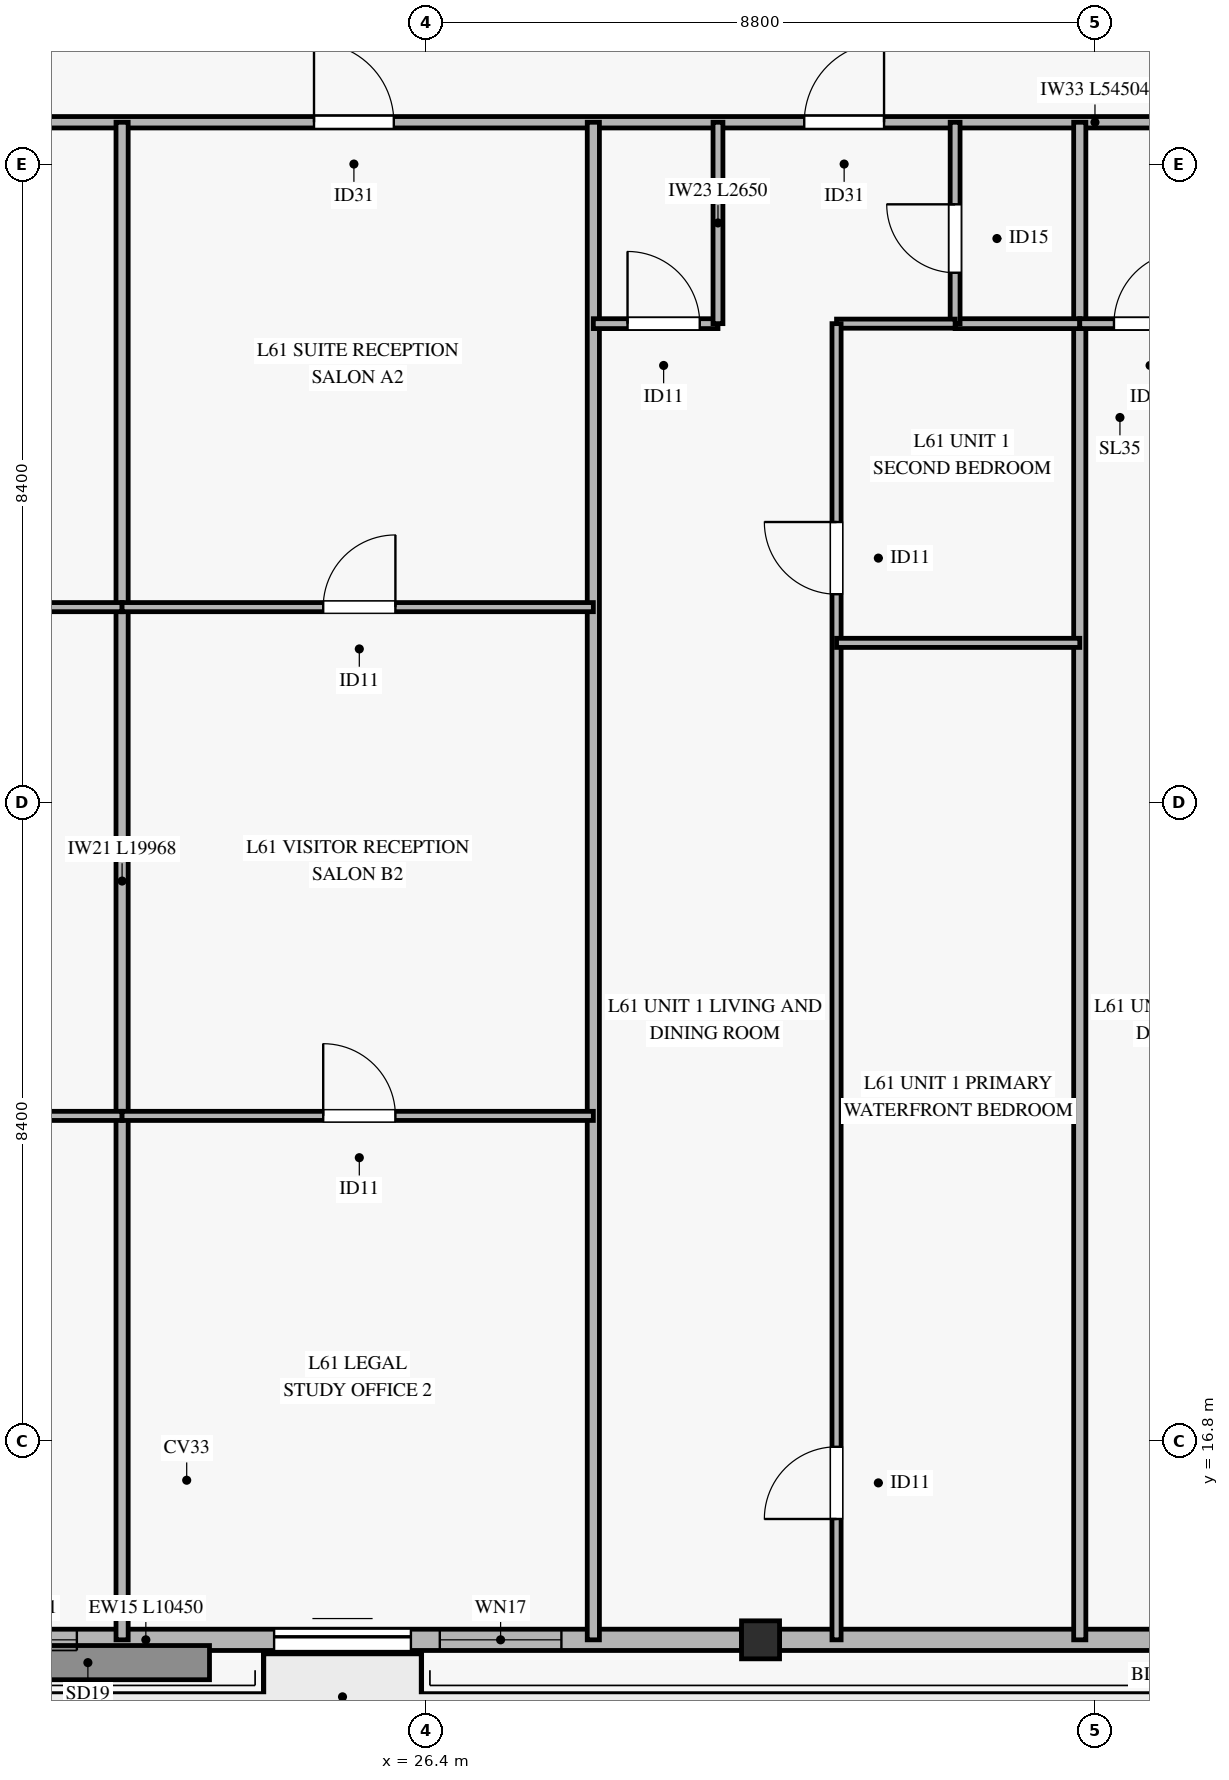
"""IFC4 building model, lengths in metres.
Left out: names, types, materials, properties, quantities, classifications, styles, units other than length and angle.
Written with IfcOpenShell. Run it as: python <this file> out.ifc"""

import sys

from ifc_helpers import new_model, si_unit, direction, frame, frame_2d, origin, origin_2d, place, context, subcontext, project, spatial, rectangle, hollow_rectangle, extrude, source, transform, mapped, element, fill, save


model = new_model("IFC4")
c1 = context("Model", 3, precision=1e-05, world=origin(), true_north=direction((0.0, 1.0)))
c2 = subcontext(c1, "Body", "Model", "MODEL_VIEW")
j1 = project(units=[si_unit("LENGTHUNIT", "METRE"), si_unit("PLANEANGLEUNIT", "RADIAN")], contexts=[c1])
p1 = place(None, origin())
s1 = spatial("IfcSite", under=j1, at=p1, CompositionType="ELEMENT")
p2 = place(p1, origin())
s2 = spatial("IfcBuilding", under=s1, at=p2, CompositionType="ELEMENT")
p3 = place(p2, frame((0.0, 0.0, 241.7)))
s3 = spatial("IfcBuildingStorey", under=s2, at=p3, CompositionType="ELEMENT", Elevation=241.7)
m1 = source(origin(), c2, "Body", "SweptSolid", [
    extrude(hollow_rectangle(XDim=0.5, YDim=0.5, WallThickness=0.024, at=origin_2d()), origin(), (0.0, 0.0, 1.0), 3.185),
])
p4 = place(p3, frame((30.8, 14.182, 0.0), z_axis=(0.0, 0.0, 1.0), x_axis=(1.0, 0.0, 0.0)))
e1 = element("IfcColumn", 1, at=p4, inside=s3, PredefinedType="COLUMN", context=c2, shape_type="MappedRepresentation", body=[
    mapped(m1, transform((0.0, 0.0, 0.0), x_axis=(1.0, 0.0, 0.0), y_axis=(0.0, 1.0, 0.0), z_axis=(0.0, 0.0, 1.0), scale=1.0)),
])
p5 = place(p3, frame((20.1, 14.182, 0.0), z_axis=(0.0, 0.0, 1.0), x_axis=(1.0, 0.0, 0.0)))
e2 = element("IfcWall", 2, at=p5, inside=s3, PredefinedType="SOLIDWALL", context=c2, shape_type="SweptSolid", body=[
    extrude(rectangle(XDim=10.45, YDim=0.28, at=frame_2d((5.225, 0.0))), origin(), (0.0, 0.0, 1.0), 2.815),
])
p6 = place(p5, frame((4.3, 0.0, 0.0)))
e3 = element("IfcOpeningElement", 3, at=p6, cuts=e2, PredefinedType="OPENING", context=c2, shape_type="SweptSolid", body=[
    extrude(rectangle(XDim=1.8, YDim=2.25, at=frame_2d((0.9, 1.125))), frame((0.0, 0.15, 0.0), z_axis=(0.0, -1.0, 0.0), x_axis=(1.0, 0.0, 0.0)), (0.0, 0.0, 1.0), 0.3),
])
p7 = place(p5, frame((0.505, 0.0, 0.45)))
e4 = element("IfcOpeningElement", 4, at=p7, cuts=e2, PredefinedType="OPENING", context=c2, shape_type="SweptSolid", body=[
    extrude(rectangle(XDim=1.2, YDim=2.0, at=frame_2d((0.6, 1.0))), frame((0.0, 0.15, 0.0), z_axis=(0.0, -1.0, 0.0), x_axis=(1.0, 0.0, 0.0)), (0.0, 0.0, 1.0), 0.3),
])
p8 = place(p5, frame((6.48, 0.0, 0.45)))
e5 = element("IfcOpeningElement", 5, at=p8, cuts=e2, PredefinedType="OPENING", context=c2, shape_type="SweptSolid", body=[
    extrude(rectangle(XDim=1.6, YDim=2.0, at=frame_2d((0.8, 1.0))), frame((0.0, 0.15, 0.0), z_axis=(0.0, -1.0, 0.0), x_axis=(1.0, 0.0, 0.0)), (0.0, 0.0, 1.0), 0.3),
])
p9 = place(p3, frame((31.05, 14.182, 0.0), z_axis=(0.0, 0.0, 1.0), x_axis=(1.0, 0.0, 0.0)))
e6 = element("IfcWall", 6, at=p9, inside=s3, PredefinedType="SOLIDWALL", context=c2, shape_type="SweptSolid", body=[
    extrude(rectangle(XDim=6.25, YDim=0.28, at=frame_2d((3.125, 0.0))), origin(), (0.0, 0.0, 1.0), 2.815),
])
p10 = place(p3, frame((7.948, 34.15, 0.0), z_axis=(0.0, 0.0, 1.0), x_axis=(1.0, 0.0, 0.0)))
e7 = element("IfcWall", 7, at=p10, inside=s3, PredefinedType="PARTITIONING", context=c2, shape_type="SweptSolid", body=[
    extrude(rectangle(XDim=54.504, YDim=0.15, at=frame_2d((27.252, 0.0))), origin(), (0.0, 0.0, 1.0), 2.47),
])
p11 = place(p10, frame((5.785, 0.0, 0.0)))
e8 = element("IfcOpeningElement", 8, at=p11, cuts=e7, PredefinedType="OPENING", context=c2, shape_type="SweptSolid", body=[
    extrude(rectangle(XDim=1.05, YDim=2.15, at=frame_2d((0.525, 1.075))), frame((0.0, 0.085, 0.0), z_axis=(0.0, -1.0, 0.0), x_axis=(1.0, 0.0, 0.0)), (0.0, 0.0, 1.0), 0.17),
])
p12 = place(p10, frame((16.977, 0.0, 0.0)))
e9 = element("IfcOpeningElement", 9, at=p12, cuts=e7, PredefinedType="OPENING", context=c2, shape_type="SweptSolid", body=[
    extrude(rectangle(XDim=1.05, YDim=2.15, at=frame_2d((0.525, 1.075))), frame((0.0, 0.085, 0.0), z_axis=(0.0, -1.0, 0.0), x_axis=(1.0, 0.0, 0.0)), (0.0, 0.0, 1.0), 0.17),
])
p13 = place(p10, frame((23.427, 0.0, 0.0)))
e10 = element("IfcOpeningElement", 10, at=p13, cuts=e7, PredefinedType="OPENING", context=c2, shape_type="SweptSolid", body=[
    extrude(rectangle(XDim=1.05, YDim=2.15, at=frame_2d((0.525, 1.075))), frame((0.0, 0.085, 0.0), z_axis=(0.0, -1.0, 0.0), x_axis=(1.0, 0.0, 0.0)), (0.0, 0.0, 1.0), 0.17),
])
p14 = place(p10, frame((29.827, 0.0, 0.0)))
e11 = element("IfcOpeningElement", 11, at=p14, cuts=e7, PredefinedType="OPENING", context=c2, shape_type="SweptSolid", body=[
    extrude(rectangle(XDim=1.05, YDim=2.15, at=frame_2d((0.525, 1.075))), frame((0.0, 0.085, 0.0), z_axis=(0.0, -1.0, 0.0), x_axis=(1.0, 0.0, 0.0)), (0.0, 0.0, 1.0), 0.17),
])
p15 = place(p10, frame((36.927, 0.0, 0.0)))
e12 = element("IfcOpeningElement", 12, at=p15, cuts=e7, PredefinedType="OPENING", context=c2, shape_type="SweptSolid", body=[
    extrude(rectangle(XDim=1.05, YDim=2.15, at=frame_2d((0.525, 1.075))), frame((0.0, 0.085, 0.0), z_axis=(0.0, -1.0, 0.0), x_axis=(1.0, 0.0, 0.0)), (0.0, 0.0, 1.0), 0.17),
])
p16 = place(p10, frame((46.381, 0.0, 0.0)))
e13 = element("IfcOpeningElement", 13, at=p16, cuts=e7, PredefinedType="OPENING", context=c2, shape_type="SweptSolid", body=[
    extrude(rectangle(XDim=1.05, YDim=2.15, at=frame_2d((0.525, 1.075))), frame((0.0, 0.085, 0.0), z_axis=(0.0, -1.0, 0.0), x_axis=(1.0, 0.0, 0.0)), (0.0, 0.0, 1.0), 0.17),
])
for number, where, z_axis, x_axis in (
    (14, (22.4, 14.182, 0.0), (0.0, 0.0, 1.0), (0.0, 1.0, 0.0)),
    (15, (28.6, 14.182, 0.0), (0.0, 0.0, 1.0), (0.0, 1.0, 0.0)),
    (16, (35.0, 14.182, 0.0), (0.0, 0.0, 1.0), (0.0, 1.0, 0.0)),
):
    element("IfcWall", number, at=place(p3, frame(where, z_axis=z_axis, x_axis=x_axis)), inside=s3, PredefinedType="PARTITIONING", context=c2, shape_type="SweptSolid", body=[
        extrude(rectangle(XDim=19.968, YDim=0.16, at=frame_2d((9.984, 0.0))), origin(), (0.0, 0.0, 1.0), 2.77),
    ])
p17 = place(p3, frame((7.948, 21.076, 0.0), z_axis=(0.0, 0.0, 1.0), x_axis=(1.0, 0.0, 0.0)))
e17 = element("IfcWall", 17, at=p17, inside=s3, PredefinedType="PARTITIONING", context=c2, shape_type="SweptSolid", body=[
    extrude(rectangle(XDim=14.452, YDim=0.12, at=frame_2d((7.226, 0.0))), origin(), (0.0, 0.0, 1.0), 2.47),
])
p18 = place(p17, frame((6.067, 0.0, 0.0)))
e18 = element("IfcOpeningElement", 18, at=p18, cuts=e17, PredefinedType="OPENING", context=c2, shape_type="SweptSolid", body=[
    extrude(rectangle(XDim=0.95, YDim=2.1, at=frame_2d((0.475, 1.05))), frame((0.0, 0.07, 0.0), z_axis=(0.0, -1.0, 0.0), x_axis=(1.0, 0.0, 0.0)), (0.0, 0.0, 1.0), 0.14),
])
p19 = place(p3, frame((7.948, 27.77, 0.0), z_axis=(0.0, 0.0, 1.0), x_axis=(1.0, 0.0, 0.0)))
e19 = element("IfcWall", 19, at=p19, inside=s3, PredefinedType="PARTITIONING", context=c2, shape_type="SweptSolid", body=[
    extrude(rectangle(XDim=14.452, YDim=0.12, at=frame_2d((7.226, 0.0))), origin(), (0.0, 0.0, 1.0), 2.47),
])
p20 = place(p19, frame((6.067, 0.0, 0.0)))
e20 = element("IfcOpeningElement", 20, at=p20, cuts=e19, PredefinedType="OPENING", context=c2, shape_type="SweptSolid", body=[
    extrude(rectangle(XDim=0.95, YDim=2.1, at=frame_2d((0.475, 1.05))), frame((0.0, 0.07, 0.0), z_axis=(0.0, -1.0, 0.0), x_axis=(1.0, 0.0, 0.0)), (0.0, 0.0, 1.0), 0.14),
])
p21 = place(p3, frame((22.4, 21.076, 0.0), z_axis=(0.0, 0.0, 1.0), x_axis=(1.0, 0.0, 0.0)))
e21 = element("IfcWall", 21, at=p21, inside=s3, PredefinedType="PARTITIONING", context=c2, shape_type="SweptSolid", body=[
    extrude(rectangle(XDim=6.2, YDim=0.12, at=frame_2d((3.1, 0.0))), origin(), (0.0, 0.0, 1.0), 3.185),
])
p22 = place(p21, frame((2.646, 0.0, 0.0)))
e22 = element("IfcOpeningElement", 22, at=p22, cuts=e21, PredefinedType="OPENING", context=c2, shape_type="SweptSolid", body=[
    extrude(rectangle(XDim=0.95, YDim=2.1, at=frame_2d((0.475, 1.05))), frame((0.0, 0.07, 0.0), z_axis=(0.0, -1.0, 0.0), x_axis=(1.0, 0.0, 0.0)), (0.0, 0.0, 1.0), 0.14),
])
p23 = place(p3, frame((22.4, 27.77, 0.0), z_axis=(0.0, 0.0, 1.0), x_axis=(1.0, 0.0, 0.0)))
e23 = element("IfcWall", 23, at=p23, inside=s3, PredefinedType="PARTITIONING", context=c2, shape_type="SweptSolid", body=[
    extrude(rectangle(XDim=6.2, YDim=0.12, at=frame_2d((3.1, 0.0))), origin(), (0.0, 0.0, 1.0), 3.185),
])
p24 = place(p23, frame((2.646, 0.0, 0.0)))
e24 = element("IfcOpeningElement", 24, at=p24, cuts=e23, PredefinedType="OPENING", context=c2, shape_type="SweptSolid", body=[
    extrude(rectangle(XDim=0.95, YDim=2.1, at=frame_2d((0.475, 1.05))), frame((0.0, 0.07, 0.0), z_axis=(0.0, -1.0, 0.0), x_axis=(1.0, 0.0, 0.0)), (0.0, 0.0, 1.0), 0.14),
])
p25 = place(p3, frame((28.6, 31.5, 0.0), z_axis=(0.0, 0.0, 1.0), x_axis=(1.0, 0.0, 0.0)))
e25 = element("IfcWall", 25, at=p25, inside=s3, PredefinedType="PARTITIONING", context=c2, shape_type="SweptSolid", body=[
    extrude(rectangle(XDim=1.64, YDim=0.13, at=frame_2d((0.82, 0.0))), origin(), (0.0, 0.0, 1.0), 3.185),
])
p26 = place(p25, frame((0.45, 0.0, 0.0)))
e26 = element("IfcOpeningElement", 26, at=p26, cuts=e25, PredefinedType="OPENING", context=c2, shape_type="SweptSolid", body=[
    extrude(rectangle(XDim=0.95, YDim=2.1, at=frame_2d((0.475, 1.05))), frame((0.0, 0.075, 0.0), z_axis=(0.0, -1.0, 0.0), x_axis=(1.0, 0.0, 0.0)), (0.0, 0.0, 1.0), 0.15),
])
p27 = place(p3, frame((30.24, 31.5, 0.0), z_axis=(0.0, 0.0, 1.0), x_axis=(0.0, 1.0, 0.0)))
e27 = element("IfcWall", 27, at=p27, inside=s3, PredefinedType="PARTITIONING", context=c2, shape_type="SweptSolid", body=[
    extrude(rectangle(XDim=2.65, YDim=0.13, at=frame_2d((1.325, 0.0))), origin(), (0.0, 0.0, 1.0), 2.77),
])
p28 = place(p3, frame((33.36, 31.5, 0.0), z_axis=(0.0, 0.0, 1.0), x_axis=(1.0, 0.0, 0.0)))
e28 = element("IfcWall", 28, at=p28, inside=s3, PredefinedType="PARTITIONING", context=c2, shape_type="SweptSolid", body=[
    extrude(rectangle(XDim=1.64, YDim=0.13, at=frame_2d((0.82, 0.0))), origin(), (0.0, 0.0, 1.0), 3.185),
])
p29 = place(p3, frame((33.36, 31.5, 0.0), z_axis=(0.0, 0.0, 1.0), x_axis=(0.0, 1.0, 0.0)))
e29 = element("IfcWall", 29, at=p29, inside=s3, PredefinedType="PARTITIONING", context=c2, shape_type="SweptSolid", body=[
    extrude(rectangle(XDim=2.65, YDim=0.13, at=frame_2d((1.325, 0.0))), origin(), (0.0, 0.0, 1.0), 2.77),
])
p30 = place(p29, frame((0.67, 0.0, 0.0)))
e30 = element("IfcOpeningElement", 30, at=p30, cuts=e29, PredefinedType="OPENING", context=c2, shape_type="SweptSolid", body=[
    extrude(rectangle(XDim=0.9, YDim=2.1, at=frame_2d((0.45, 1.05))), frame((0.0, 0.075, 0.0), z_axis=(0.0, -1.0, 0.0), x_axis=(1.0, 0.0, 0.0)), (0.0, 0.0, 1.0), 0.15),
])
p31 = place(p3, frame((31.8, 31.5, 0.0), z_axis=(0.0, 0.0, 1.0), x_axis=(1.0, 0.0, 0.0)))
e31 = element("IfcWall", 31, at=p31, inside=s3, PredefinedType="PARTITIONING", context=c2, shape_type="SweptSolid", body=[
    extrude(rectangle(XDim=1.56, YDim=0.12, at=frame_2d((0.78, 0.0))), origin(), (0.0, 0.0, 1.0), 3.185),
])
p32 = place(p3, frame((31.8, 14.182, 0.0), z_axis=(0.0, 0.0, 1.0), x_axis=(0.0, 1.0, 0.0)))
e32 = element("IfcWall", 32, at=p32, inside=s3, PredefinedType="PARTITIONING", context=c2, shape_type="SweptSolid", body=[
    extrude(rectangle(XDim=17.318, YDim=0.12, at=frame_2d((8.659, 0.0))), origin(), (0.0, 0.0, 1.0), 2.77),
])
p33 = place(p32, frame((1.59, 0.0, 0.0)))
e33 = element("IfcOpeningElement", 33, at=p33, cuts=e32, PredefinedType="OPENING", context=c2, shape_type="SweptSolid", body=[
    extrude(rectangle(XDim=0.95, YDim=2.1, at=frame_2d((0.475, 1.05))), frame((0.0, 0.07, 0.0), z_axis=(0.0, -1.0, 0.0), x_axis=(1.0, 0.0, 0.0)), (0.0, 0.0, 1.0), 0.14),
])
p34 = place(p32, frame((13.758, 0.0, 0.0)))
e34 = element("IfcOpeningElement", 34, at=p34, cuts=e32, PredefinedType="OPENING", context=c2, shape_type="SweptSolid", body=[
    extrude(rectangle(XDim=0.95, YDim=2.1, at=frame_2d((0.475, 1.05))), frame((0.0, 0.07, 0.0), z_axis=(0.0, -1.0, 0.0), x_axis=(1.0, 0.0, 0.0)), (0.0, 0.0, 1.0), 0.14),
])
p35 = place(p3, frame((31.8, 27.3, 0.0), z_axis=(0.0, 0.0, 1.0), x_axis=(1.0, 0.0, 0.0)))
e35 = element("IfcWall", 35, at=p35, inside=s3, PredefinedType="PARTITIONING", context=c2, shape_type="SweptSolid", body=[
    extrude(rectangle(XDim=3.2, YDim=0.12, at=frame_2d((1.6, 0.0))), origin(), (0.0, 0.0, 1.0), 3.185),
])
p36 = place(p3, frame((35.0, 31.5, 0.0), z_axis=(0.0, 0.0, 1.0), x_axis=(1.0, 0.0, 0.0)))
e36 = element("IfcWall", 36, at=p36, inside=s3, PredefinedType="PARTITIONING", context=c2, shape_type="SweptSolid", body=[
    extrude(rectangle(XDim=1.64, YDim=0.13, at=frame_2d((0.82, 0.0))), origin(), (0.0, 0.0, 1.0), 3.185),
])
p37 = place(p36, frame((0.45, 0.0, 0.0)))
e37 = element("IfcOpeningElement", 37, at=p37, cuts=e36, PredefinedType="OPENING", context=c2, shape_type="SweptSolid", body=[
    extrude(rectangle(XDim=0.95, YDim=2.1, at=frame_2d((0.475, 1.05))), frame((0.0, 0.075, 0.0), z_axis=(0.0, -1.0, 0.0), x_axis=(1.0, 0.0, 0.0)), (0.0, 0.0, 1.0), 0.15),
])
m2 = source(origin(), c2, "Body", "SweptSolid", [
    extrude(rectangle(XDim=1.8, YDim=2.25, at=frame_2d((0.9, 1.125))), frame((0.0, 0.025, 0.0), z_axis=(0.0, -1.0, 0.0), x_axis=(1.0, 0.0, 0.0)), (0.0, 0.0, 1.0), 0.05),
])
p38 = place(p6, origin())
e38 = element("IfcDoor", 38, at=p38, inside=s3, OperationType="SLIDING_TO_LEFT", PredefinedType="DOOR", context=c2, shape_type="MappedRepresentation", body=[
    mapped(m2, transform((0.0, 0.0, 0.0), x_axis=(1.0, 0.0, 0.0), y_axis=(0.0, 1.0, 0.0), z_axis=(0.0, 0.0, 1.0), scale=1.0)),
])
fill(e3, e38)
m3 = source(origin(), c2, "Body", "SweptSolid", [
    extrude(rectangle(XDim=1.2, YDim=2.0, at=frame_2d((0.6, 1.0))), frame((0.0, 0.03, 0.0), z_axis=(0.0, -1.0, 0.0), x_axis=(1.0, 0.0, 0.0)), (0.0, 0.0, 1.0), 0.06),
])
p39 = place(p7, origin())
e39 = element("IfcWindow", 39, at=p39, inside=s3, PartitioningType="SINGLE_PANEL", PredefinedType="WINDOW", context=c2, shape_type="MappedRepresentation", body=[
    mapped(m3, transform((0.0, 0.0, 0.0), x_axis=(1.0, 0.0, 0.0), y_axis=(0.0, 1.0, 0.0), z_axis=(0.0, 0.0, 1.0), scale=1.0)),
])
fill(e4, e39)
m4 = source(origin(), c2, "Body", "SweptSolid", [
    extrude(rectangle(XDim=1.6, YDim=2.0, at=frame_2d((0.8, 1.0))), frame((0.0, 0.03, 0.0), z_axis=(0.0, -1.0, 0.0), x_axis=(1.0, 0.0, 0.0)), (0.0, 0.0, 1.0), 0.06),
])
p40 = place(p8, origin())
e40 = element("IfcWindow", 40, at=p40, inside=s3, PartitioningType="SINGLE_PANEL", PredefinedType="WINDOW", context=c2, shape_type="MappedRepresentation", body=[
    mapped(m4, transform((0.0, 0.0, 0.0), x_axis=(1.0, 0.0, 0.0), y_axis=(0.0, 1.0, 0.0), z_axis=(0.0, 0.0, 1.0), scale=1.0)),
])
fill(e5, e40)
m5 = source(origin(), c2, "Body", "SweptSolid", [
    extrude(rectangle(XDim=1.05, YDim=2.15, at=frame_2d((0.525, 1.075))), frame((0.0, 0.025, 0.0), z_axis=(0.0, -1.0, 0.0), x_axis=(1.0, 0.0, 0.0)), (0.0, 0.0, 1.0), 0.05),
])
p41 = place(p12, origin())
e41 = element("IfcDoor", 41, at=p41, inside=s3, OperationType="SINGLE_SWING_LEFT", PredefinedType="DOOR", context=c2, shape_type="MappedRepresentation", body=[
    mapped(m5, transform((0.0, 0.0, 0.0), x_axis=(1.0, 0.0, 0.0), y_axis=(0.0, 1.0, 0.0), z_axis=(0.0, 0.0, 1.0), scale=1.0)),
])
fill(e9, e41)
m6 = source(origin(), c2, "Body", "SweptSolid", [
    extrude(rectangle(XDim=0.95, YDim=2.1, at=frame_2d((0.475, 1.05))), frame((0.0, 0.025, 0.0), z_axis=(0.0, -1.0, 0.0), x_axis=(1.0, 0.0, 0.0)), (0.0, 0.0, 1.0), 0.05),
])
p42 = place(p24, origin())
e42 = element("IfcDoor", 42, at=p42, inside=s3, OperationType="SINGLE_SWING_RIGHT", PredefinedType="DOOR", context=c2, shape_type="MappedRepresentation", body=[
    mapped(m6, transform((0.0, 0.0, 0.0), x_axis=(1.0, 0.0, 0.0), y_axis=(0.0, 1.0, 0.0), z_axis=(0.0, 0.0, 1.0), scale=1.0)),
])
fill(e24, e42)
p43 = place(p22, origin())
e43 = element("IfcDoor", 43, at=p43, inside=s3, OperationType="SINGLE_SWING_LEFT", PredefinedType="DOOR", context=c2, shape_type="MappedRepresentation", body=[
    mapped(m6, transform((0.0, 0.0, 0.0), x_axis=(1.0, 0.0, 0.0), y_axis=(0.0, 1.0, 0.0), z_axis=(0.0, 0.0, 1.0), scale=1.0)),
])
fill(e22, e43)
p44 = place(p13, origin())
e44 = element("IfcDoor", 44, at=p44, inside=s3, OperationType="SINGLE_SWING_RIGHT", PredefinedType="DOOR", context=c2, shape_type="MappedRepresentation", body=[
    mapped(m5, transform((0.0, 0.0, 0.0), x_axis=(1.0, 0.0, 0.0), y_axis=(0.0, 1.0, 0.0), z_axis=(0.0, 0.0, 1.0), scale=1.0)),
])
fill(e10, e44)
p45 = place(p26, origin())
e45 = element("IfcDoor", 45, at=p45, inside=s3, OperationType="SINGLE_SWING_LEFT", PredefinedType="DOOR", context=c2, shape_type="MappedRepresentation", body=[
    mapped(m6, transform((0.0, 0.0, 0.0), x_axis=(1.0, 0.0, 0.0), y_axis=(0.0, 1.0, 0.0), z_axis=(0.0, 0.0, 1.0), scale=1.0)),
])
fill(e26, e45)
m7 = source(origin(), c2, "Body", "SweptSolid", [
    extrude(rectangle(XDim=0.9, YDim=2.1, at=frame_2d((0.45, 1.05))), frame((0.0, 0.025, 0.0), z_axis=(0.0, -1.0, 0.0), x_axis=(1.0, 0.0, 0.0)), (0.0, 0.0, 1.0), 0.05),
])
p46 = place(p30, origin())
e46 = element("IfcDoor", 46, at=p46, inside=s3, OperationType="SINGLE_SWING_RIGHT", PredefinedType="DOOR", context=c2, shape_type="MappedRepresentation", body=[
    mapped(m7, transform((0.0, 0.0, 0.0), x_axis=(1.0, 0.0, 0.0), y_axis=(0.0, 1.0, 0.0), z_axis=(0.0, 0.0, 1.0), scale=1.0)),
])
fill(e30, e46)
p47 = place(p33, origin())
e47 = element("IfcDoor", 47, at=p47, inside=s3, OperationType="SINGLE_SWING_LEFT", PredefinedType="DOOR", context=c2, shape_type="MappedRepresentation", body=[
    mapped(m6, transform((0.0, 0.0, 0.0), x_axis=(1.0, 0.0, 0.0), y_axis=(0.0, 1.0, 0.0), z_axis=(0.0, 0.0, 1.0), scale=1.0)),
])
fill(e33, e47)
p48 = place(p34, origin())
e48 = element("IfcDoor", 48, at=p48, inside=s3, OperationType="SINGLE_SWING_RIGHT", PredefinedType="DOOR", context=c2, shape_type="MappedRepresentation", body=[
    mapped(m6, transform((0.0, 0.0, 0.0), x_axis=(1.0, 0.0, 0.0), y_axis=(0.0, 1.0, 0.0), z_axis=(0.0, 0.0, 1.0), scale=1.0)),
])
fill(e34, e48)
p49 = place(p37, origin())
e49 = element("IfcDoor", 49, at=p49, inside=s3, OperationType="SINGLE_SWING_RIGHT", PredefinedType="DOOR", context=c2, shape_type="MappedRepresentation", body=[
    mapped(m6, transform((0.0, 0.0, 0.0), x_axis=(1.0, 0.0, 0.0), y_axis=(0.0, 1.0, 0.0), z_axis=(0.0, 0.0, 1.0), scale=1.0)),
])
fill(e37, e49)
save(model, sys.argv[1])
